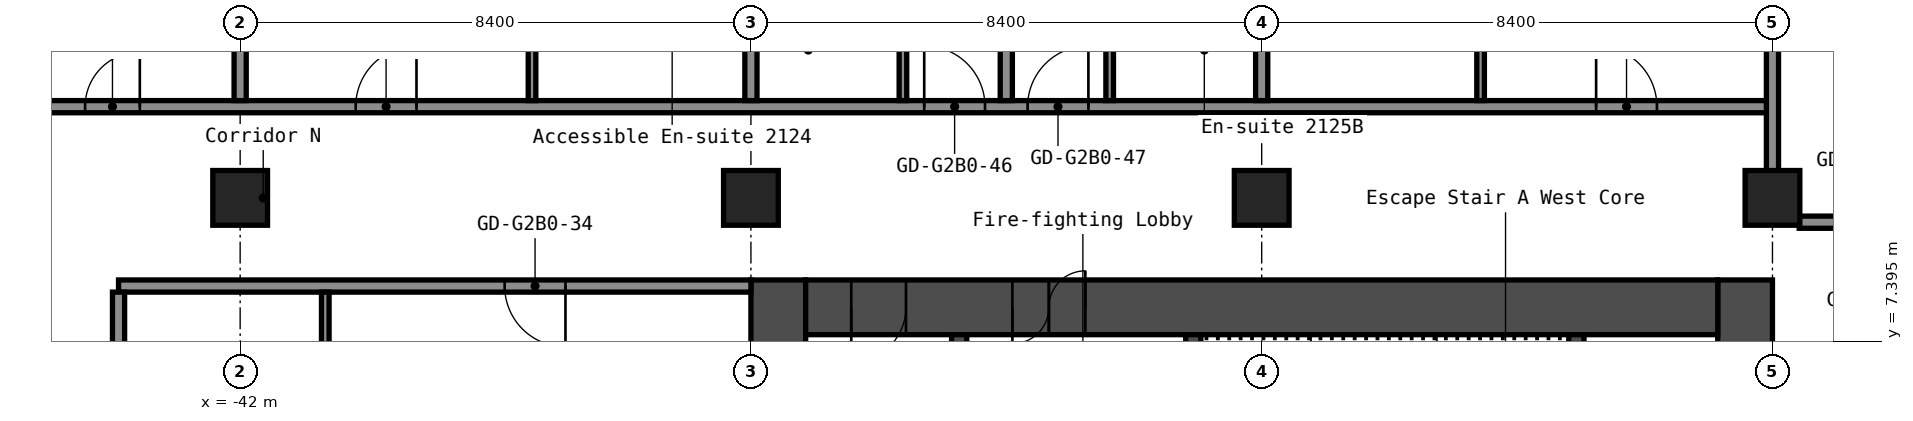
"""IFC4 building model, lengths in metres.
Left out: names, types, materials, properties, quantities, classifications, styles, units other than length and angle.
Written with IfcOpenShell. Run it as: python <this file> out.ifc"""

import sys

from ifc_helpers import new_model, si_unit, direction, frame, frame_2d, origin, origin_2d, place, context, subcontext, project, spatial, rectangle, hollow_rectangle, extrude, element, fill, save


model = new_model("IFC4")
c1 = context("Model", 3, precision=1e-05, world=origin(), true_north=direction((0.0, 1.0)))
c2 = subcontext(c1, "Body", "Model", "MODEL_VIEW")
j1 = project(units=[si_unit("LENGTHUNIT", "METRE"), si_unit("PLANEANGLEUNIT", "RADIAN")], contexts=[c1])
p1 = place(None, origin())
s1 = spatial("IfcSite", under=j1, at=p1, CompositionType="ELEMENT")
p2 = place(p1, origin())
s2 = spatial("IfcBuilding", under=s1, at=p2, CompositionType="ELEMENT")
p3 = place(p2, frame((0.0, 0.0, 78.6)))
s3 = spatial("IfcBuildingStorey", under=s2, at=p3, CompositionType="ELEMENT", Elevation=78.6)
for number, where, z_axis, x_axis in (
    (1, (-42.0, 9.75, 0.0), (0.0, 0.0, 1.0), (1.0, 0.0, 0.0)),
    (2, (-33.6, 9.75, 0.0), (0.0, 0.0, 1.0), (1.0, 0.0, 0.0)),
    (3, (-25.2, 9.75, 0.0), (0.0, 0.0, 1.0), (1.0, 0.0, 0.0)),
    (4, (-16.8, 9.75, 0.0), (0.0, 0.0, 1.0), (1.0, 0.0, 0.0)),
):
    element("IfcColumn", number, at=place(p3, frame(where, z_axis=z_axis, x_axis=x_axis)), inside=s3, PredefinedType="COLUMN", context=c2, shape_type="SweptSolid", body=[
        extrude(hollow_rectangle(XDim=0.9, YDim=0.9, WallThickness=0.036, at=origin_2d()), origin(), (0.0, 0.0, 1.0), 2.8),
    ])
p4 = place(p3, frame((-17.25, -8.4, 0.0), z_axis=(0.0, 0.0, 1.0), x_axis=(0.0, 1.0, 0.0)))
e5 = element("IfcWall", 5, at=p4, inside=s3, PredefinedType="SHEAR", context=c2, shape_type="SweptSolid", body=[
    extrude(rectangle(XDim=16.8, YDim=0.9, at=frame_2d((8.4, 0.0))), origin(), (0.0, 0.0, 1.0), 2.8),
])
p5 = place(p4, frame((7.6, 0.0, 0.0)))
e6 = element("IfcOpeningElement", 6, at=p5, cuts=e5, PredefinedType="OPENING", context=c2, shape_type="SweptSolid", body=[
    extrude(rectangle(XDim=1.2, YDim=2.1, at=frame_2d((0.6, 1.05))), frame((0.0, 0.46, 0.0), z_axis=(0.0, -1.0, 0.0), x_axis=(1.0, 0.0, 0.0)), (0.0, 0.0, 1.0), 0.92),
])
p6 = place(p3, frame((-33.15, -8.4, 0.0), z_axis=(0.0, 0.0, 1.0), x_axis=(0.0, 1.0, 0.0)))
e7 = element("IfcWall", 7, at=p6, inside=s3, PredefinedType="SHEAR", context=c2, shape_type="SweptSolid", body=[
    extrude(rectangle(XDim=16.8, YDim=0.9, at=frame_2d((8.4, 0.0))), origin(), (0.0, 0.0, 1.0), 2.8),
])
p7 = place(p3, frame((-32.7, 7.95, 0.0), z_axis=(0.0, 0.0, 1.0), x_axis=(1.0, 0.0, 0.0)))
e8 = element("IfcWall", 8, at=p7, inside=s3, PredefinedType="SHEAR", context=c2, shape_type="SweptSolid", body=[
    extrude(rectangle(XDim=15.0, YDim=0.9, at=frame_2d((7.5, 0.0))), origin(), (0.0, 0.0, 1.0), 2.8),
])
p8 = place(p7, frame((3.4, 0.0, 0.0)))
e9 = element("IfcOpeningElement", 9, at=p8, cuts=e8, PredefinedType="OPENING", context=c2, shape_type="SweptSolid", body=[
    extrude(rectangle(XDim=1.2, YDim=2.1, at=frame_2d((0.6, 1.05))), frame((0.0, 0.46, 0.0), z_axis=(0.0, -1.0, 0.0), x_axis=(1.0, 0.0, 0.0)), (0.0, 0.0, 1.0), 0.92),
])
p9 = place(p7, frame((0.75, 0.0, 0.0)))
e10 = element("IfcOpeningElement", 10, at=p9, cuts=e8, PredefinedType="OPENING", context=c2, shape_type="SweptSolid", body=[
    extrude(rectangle(XDim=0.9, YDim=2.1, at=frame_2d((0.45, 1.05))), frame((0.0, 0.46, 0.0), z_axis=(0.0, -1.0, 0.0), x_axis=(1.0, 0.0, 0.0)), (0.0, 0.0, 1.0), 0.92),
])
p10 = place(p3, frame((-20.025, 1.2, 0.0), z_axis=(0.0, 0.0, 1.0), x_axis=(0.0, 1.0, 0.0)))
e11 = element("IfcWall", 11, at=p10, inside=s3, PredefinedType="SHEAR", context=c2, shape_type="SweptSolid", body=[
    extrude(rectangle(XDim=6.3, YDim=0.25, at=frame_2d((3.15, 0.0))), origin(), (0.0, 0.0, 1.0), 2.8),
])
p11 = place(p3, frame((-26.325, 3.75, 0.0), z_axis=(0.0, 0.0, 1.0), x_axis=(0.0, 1.0, 0.0)))
e12 = element("IfcWall", 12, at=p11, inside=s3, PredefinedType="SHEAR", context=c2, shape_type="SweptSolid", body=[
    extrude(rectangle(XDim=3.75, YDim=0.25, at=frame_2d((1.875, 0.0))), origin(), (0.0, 0.0, 1.0), 2.8),
])
p12 = place(p11, frame((1.25, 0.0, 0.0)))
e13 = element("IfcOpeningElement", 13, at=p12, cuts=e12, PredefinedType="OPENING", context=c2, shape_type="SweptSolid", body=[
    extrude(rectangle(XDim=1.2, YDim=2.1, at=frame_2d((0.6, 1.05))), frame((0.0, 0.135, 0.0), z_axis=(0.0, -1.0, 0.0), x_axis=(1.0, 0.0, 0.0)), (0.0, 0.0, 1.0), 0.27),
])
p13 = place(p3, frame((-30.175, 1.45, 0.0), z_axis=(0.0, 0.0, 1.0), x_axis=(0.0, 1.0, 0.0)))
e14 = element("IfcWall", 14, at=p13, inside=s3, PredefinedType="SHEAR", context=c2, shape_type="SweptSolid", body=[
    extrude(rectangle(XDim=6.05, YDim=0.25, at=frame_2d((3.025, 0.0))), origin(), (0.0, 0.0, 1.0), 2.8),
])
p14 = place(p13, frame((2.625, 0.0, 0.0)))
e15 = element("IfcOpeningElement", 15, at=p14, cuts=e14, PredefinedType="OPENING", context=c2, shape_type="SweptSolid", body=[
    extrude(rectangle(XDim=1.1, YDim=2.1, at=frame_2d((0.55, 1.05))), frame((0.0, 0.135, 0.0), z_axis=(0.0, -1.0, 0.0), x_axis=(1.0, 0.0, 0.0)), (0.0, 0.0, 1.0), 0.27),
])
p15 = place(p3, frame((-44.0, 8.3, 0.0), z_axis=(0.0, 0.0, 1.0), x_axis=(1.0, 0.0, 0.0)))
e16 = element("IfcWall", 16, at=p15, inside=s3, PredefinedType="PARTITIONING", context=c2, shape_type="SweptSolid", body=[
    extrude(rectangle(XDim=10.4, YDim=0.2, at=frame_2d((5.2, 0.0))), origin(), (0.0, 0.0, 1.0), 2.8),
])
p16 = place(p15, frame((6.35, 0.0, 0.0)))
e17 = element("IfcOpeningElement", 17, at=p16, cuts=e16, PredefinedType="OPENING", context=c2, shape_type="SweptSolid", body=[
    extrude(rectangle(XDim=1.0, YDim=2.1, at=frame_2d((0.5, 1.05))), frame((0.0, 0.11, 0.0), z_axis=(0.0, -1.0, 0.0), x_axis=(1.0, 0.0, 0.0)), (0.0, 0.0, 1.0), 0.22),
])
p17 = place(p3, frame((-16.36, 9.35, 0.0), z_axis=(0.0, 0.0, 1.0), x_axis=(1.0, 0.0, 0.0)))
e18 = element("IfcWall", 18, at=p17, inside=s3, PredefinedType="PARTITIONING", context=c2, shape_type="SweptSolid", body=[
    extrude(rectangle(XDim=32.72, YDim=0.2, at=frame_2d((16.36, 0.0))), origin(), (0.0, 0.0, 1.0), 2.8),
])
p18 = place(p17, frame((0.79, 0.0, 0.0)))
e19 = element("IfcOpeningElement", 19, at=p18, cuts=e18, PredefinedType="OPENING", context=c2, shape_type="SweptSolid", body=[
    extrude(rectangle(XDim=0.9, YDim=2.1, at=frame_2d((0.45, 1.05))), frame((0.0, 0.11, 0.0), z_axis=(0.0, -1.0, 0.0), x_axis=(1.0, 0.0, 0.0)), (0.0, 0.0, 1.0), 0.22),
])
p19 = place(p17, frame((4.99, 0.0, 0.0)))
e20 = element("IfcOpeningElement", 20, at=p19, cuts=e18, PredefinedType="OPENING", context=c2, shape_type="SweptSolid", body=[
    extrude(rectangle(XDim=0.9, YDim=2.1, at=frame_2d((0.45, 1.05))), frame((0.0, 0.11, 0.0), z_axis=(0.0, -1.0, 0.0), x_axis=(1.0, 0.0, 0.0)), (0.0, 0.0, 1.0), 0.22),
])
p20 = place(p17, frame((9.275, 0.0, 0.0)))
e21 = element("IfcOpeningElement", 21, at=p20, cuts=e18, PredefinedType="OPENING", context=c2, shape_type="SweptSolid", body=[
    extrude(rectangle(XDim=0.9, YDim=2.1, at=frame_2d((0.45, 1.05))), frame((0.0, 0.11, 0.0), z_axis=(0.0, -1.0, 0.0), x_axis=(1.0, 0.0, 0.0)), (0.0, 0.0, 1.0), 0.22),
])
p21 = place(p17, frame((13.475, 0.0, 0.0)))
e22 = element("IfcOpeningElement", 22, at=p21, cuts=e18, PredefinedType="OPENING", context=c2, shape_type="SweptSolid", body=[
    extrude(rectangle(XDim=0.9, YDim=2.1, at=frame_2d((0.45, 1.05))), frame((0.0, 0.11, 0.0), z_axis=(0.0, -1.0, 0.0), x_axis=(1.0, 0.0, 0.0)), (0.0, 0.0, 1.0), 0.22),
])
p22 = place(p17, frame((19.21, 0.0, 0.0)))
e23 = element("IfcOpeningElement", 23, at=p22, cuts=e18, PredefinedType="OPENING", context=c2, shape_type="SweptSolid", body=[
    extrude(rectangle(XDim=1.0, YDim=2.1, at=frame_2d((0.5, 1.05))), frame((0.0, 0.11, 0.0), z_axis=(0.0, -1.0, 0.0), x_axis=(1.0, 0.0, 0.0)), (0.0, 0.0, 1.0), 0.22),
])
p23 = place(p17, frame((20.91, 0.0, 0.0)))
e24 = element("IfcOpeningElement", 24, at=p23, cuts=e18, PredefinedType="OPENING", context=c2, shape_type="SweptSolid", body=[
    extrude(rectangle(XDim=1.0, YDim=2.1, at=frame_2d((0.5, 1.05))), frame((0.0, 0.11, 0.0), z_axis=(0.0, -1.0, 0.0), x_axis=(1.0, 0.0, 0.0)), (0.0, 0.0, 1.0), 0.22),
])
p24 = place(p17, frame((27.61, 0.0, 0.0)))
e25 = element("IfcOpeningElement", 25, at=p24, cuts=e18, PredefinedType="OPENING", context=c2, shape_type="SweptSolid", body=[
    extrude(rectangle(XDim=1.0, YDim=2.1, at=frame_2d((0.5, 1.05))), frame((0.0, 0.11, 0.0), z_axis=(0.0, -1.0, 0.0), x_axis=(1.0, 0.0, 0.0)), (0.0, 0.0, 1.0), 0.22),
])
p25 = place(p17, frame((29.31, 0.0, 0.0)))
e26 = element("IfcOpeningElement", 26, at=p25, cuts=e18, PredefinedType="OPENING", context=c2, shape_type="SweptSolid", body=[
    extrude(rectangle(XDim=1.0, YDim=2.1, at=frame_2d((0.5, 1.05))), frame((0.0, 0.11, 0.0), z_axis=(0.0, -1.0, 0.0), x_axis=(1.0, 0.0, 0.0)), (0.0, 0.0, 1.0), 0.22),
])
p26 = place(p3, frame((-46.5, 11.25, 0.0), z_axis=(0.0, 0.0, 1.0), x_axis=(1.0, 0.0, 0.0)))
e27 = element("IfcWall", 27, at=p26, inside=s3, PredefinedType="PARTITIONING", context=c2, shape_type="SweptSolid", body=[
    extrude(rectangle(XDim=29.7, YDim=0.2, at=frame_2d((14.85, 0.0))), origin(), (0.0, 0.0, 1.0), 2.8),
])
p27 = place(p26, frame((1.95, 0.0, 0.0)))
e28 = element("IfcOpeningElement", 28, at=p27, cuts=e27, PredefinedType="OPENING", context=c2, shape_type="SweptSolid", body=[
    extrude(rectangle(XDim=0.9, YDim=2.1, at=frame_2d((0.45, 1.05))), frame((0.0, 0.11, 0.0), z_axis=(0.0, -1.0, 0.0), x_axis=(1.0, 0.0, 0.0)), (0.0, 0.0, 1.0), 0.22),
])
p28 = place(p26, frame((6.4, 0.0, 0.0)))
e29 = element("IfcOpeningElement", 29, at=p28, cuts=e27, PredefinedType="OPENING", context=c2, shape_type="SweptSolid", body=[
    extrude(rectangle(XDim=1.0, YDim=2.1, at=frame_2d((0.5, 1.05))), frame((0.0, 0.11, 0.0), z_axis=(0.0, -1.0, 0.0), x_axis=(1.0, 0.0, 0.0)), (0.0, 0.0, 1.0), 0.22),
])
p29 = place(p26, frame((15.75, 0.0, 0.0)))
e30 = element("IfcOpeningElement", 30, at=p29, cuts=e27, PredefinedType="OPENING", context=c2, shape_type="SweptSolid", body=[
    extrude(rectangle(XDim=1.0, YDim=2.1, at=frame_2d((0.5, 1.05))), frame((0.0, 0.11, 0.0), z_axis=(0.0, -1.0, 0.0), x_axis=(1.0, 0.0, 0.0)), (0.0, 0.0, 1.0), 0.22),
])
p30 = place(p26, frame((17.45, 0.0, 0.0)))
e31 = element("IfcOpeningElement", 31, at=p30, cuts=e27, PredefinedType="OPENING", context=c2, shape_type="SweptSolid", body=[
    extrude(rectangle(XDim=1.0, YDim=2.1, at=frame_2d((0.5, 1.05))), frame((0.0, 0.11, 0.0), z_axis=(0.0, -1.0, 0.0), x_axis=(1.0, 0.0, 0.0)), (0.0, 0.0, 1.0), 0.22),
])
p31 = place(p26, frame((26.8, 0.0, 0.0)))
e32 = element("IfcOpeningElement", 32, at=p31, cuts=e27, PredefinedType="OPENING", context=c2, shape_type="SweptSolid", body=[
    extrude(rectangle(XDim=1.0, YDim=2.1, at=frame_2d((0.5, 1.05))), frame((0.0, 0.11, 0.0), z_axis=(0.0, -1.0, 0.0), x_axis=(1.0, 0.0, 0.0)), (0.0, 0.0, 1.0), 0.22),
])
p32 = place(p3, frame((-44.0, -8.2, 0.0), z_axis=(0.0, 0.0, 1.0), x_axis=(0.0, 1.0, 0.0)))
e33 = element("IfcWall", 33, at=p32, inside=s3, PredefinedType="PARTITIONING", context=c2, shape_type="SweptSolid", body=[
    extrude(rectangle(XDim=16.4, YDim=0.2, at=frame_2d((8.2, 0.0))), origin(), (0.0, 0.0, 1.0), 2.8),
])
p33 = place(p3, frame((-42.0, 11.35, 0.0), z_axis=(0.0, 0.0, 1.0), x_axis=(0.0, 1.0, 0.0)))
e34 = element("IfcWall", 34, at=p33, inside=s3, PredefinedType="PARTITIONING", context=c2, shape_type="SweptSolid", body=[
    extrude(rectangle(XDim=12.2, YDim=0.2, at=frame_2d((6.1, 0.0))), origin(), (0.0, 0.0, 1.0), 2.8),
])
p34 = place(p3, frame((-40.6, 4.9, 0.0), z_axis=(0.0, 0.0, 1.0), x_axis=(0.0, 1.0, 0.0)))
e35 = element("IfcWall", 35, at=p34, inside=s3, PredefinedType="PARTITIONING", context=c2, shape_type="SweptSolid", body=[
    extrude(rectangle(XDim=3.3, YDim=0.125, at=frame_2d((1.65, 0.0))), origin(), (0.0, 0.0, 1.0), 2.8),
])
p35 = place(p3, frame((-37.2, 11.35, 0.0), z_axis=(0.0, 0.0, 1.0), x_axis=(0.0, 1.0, 0.0)))
e36 = element("IfcWall", 36, at=p35, inside=s3, PredefinedType="PARTITIONING", context=c2, shape_type="SweptSolid", body=[
    extrude(rectangle(XDim=3.3, YDim=0.125, at=frame_2d((1.65, 0.0))), origin(), (0.0, 0.0, 1.0), 2.8),
])
p36 = place(p35, frame((1.1, 0.0, 0.0)))
e37 = element("IfcOpeningElement", 37, at=p36, cuts=e36, PredefinedType="OPENING", context=c2, shape_type="SweptSolid", body=[
    extrude(rectangle(XDim=1.0, YDim=2.1, at=frame_2d((0.5, 1.05))), frame((0.0, 0.073, 0.0), z_axis=(0.0, -1.0, 0.0), x_axis=(1.0, 0.0, 0.0)), (0.0, 0.0, 1.0), 0.145),
])
p37 = place(p3, frame((-33.6, 11.35, 0.0), z_axis=(0.0, 0.0, 1.0), x_axis=(0.0, 1.0, 0.0)))
e38 = element("IfcWall", 38, at=p37, inside=s3, PredefinedType="PARTITIONING", context=c2, shape_type="SweptSolid", body=[
    extrude(rectangle(XDim=12.2, YDim=0.2, at=frame_2d((6.1, 0.0))), origin(), (0.0, 0.0, 1.0), 2.8),
])
p38 = place(p3, frame((-31.1, 11.35, 0.0), z_axis=(0.0, 0.0, 1.0), x_axis=(0.0, 1.0, 0.0)))
e39 = element("IfcWall", 39, at=p38, inside=s3, PredefinedType="PARTITIONING", context=c2, shape_type="SweptSolid", body=[
    extrude(rectangle(XDim=2.9, YDim=0.125, at=frame_2d((1.45, 0.0))), origin(), (0.0, 0.0, 1.0), 2.8),
])
p39 = place(p38, frame((1.5, 0.0, 0.0)))
e40 = element("IfcOpeningElement", 40, at=p39, cuts=e39, PredefinedType="OPENING", context=c2, shape_type="SweptSolid", body=[
    extrude(rectangle(XDim=0.8, YDim=2.1, at=frame_2d((0.4, 1.05))), frame((0.0, 0.073, 0.0), z_axis=(0.0, -1.0, 0.0), x_axis=(1.0, 0.0, 0.0)), (0.0, 0.0, 1.0), 0.145),
])
p40 = place(p3, frame((-29.4, 11.35, 0.0), z_axis=(0.0, 0.0, 1.0), x_axis=(0.0, 1.0, 0.0)))
e41 = element("IfcWall", 41, at=p40, inside=s3, PredefinedType="PARTITIONING", context=c2, shape_type="SweptSolid", body=[
    extrude(rectangle(XDim=12.2, YDim=0.2, at=frame_2d((6.1, 0.0))), origin(), (0.0, 0.0, 1.0), 2.8),
])
p41 = place(p3, frame((-27.7, 11.35, 0.0), z_axis=(0.0, 0.0, 1.0), x_axis=(0.0, 1.0, 0.0)))
e42 = element("IfcWall", 42, at=p41, inside=s3, PredefinedType="PARTITIONING", context=c2, shape_type="SweptSolid", body=[
    extrude(rectangle(XDim=2.9, YDim=0.125, at=frame_2d((1.45, 0.0))), origin(), (0.0, 0.0, 1.0), 2.8),
])
p42 = place(p41, frame((1.5, 0.0, 0.0)))
e43 = element("IfcOpeningElement", 43, at=p42, cuts=e42, PredefinedType="OPENING", context=c2, shape_type="SweptSolid", body=[
    extrude(rectangle(XDim=0.8, YDim=2.1, at=frame_2d((0.4, 1.05))), frame((0.0, 0.073, 0.0), z_axis=(0.0, -1.0, 0.0), x_axis=(1.0, 0.0, 0.0)), (0.0, 0.0, 1.0), 0.145),
])
p43 = place(p3, frame((-25.2, 11.35, 0.0), z_axis=(0.0, 0.0, 1.0), x_axis=(0.0, 1.0, 0.0)))
e44 = element("IfcWall", 44, at=p43, inside=s3, PredefinedType="PARTITIONING", context=c2, shape_type="SweptSolid", body=[
    extrude(rectangle(XDim=12.2, YDim=0.2, at=frame_2d((6.1, 0.0))), origin(), (0.0, 0.0, 1.0), 2.8),
])
p44 = place(p3, frame((-21.6, 11.35, 0.0), z_axis=(0.0, 0.0, 1.0), x_axis=(0.0, 1.0, 0.0)))
e45 = element("IfcWall", 45, at=p44, inside=s3, PredefinedType="PARTITIONING", context=c2, shape_type="SweptSolid", body=[
    extrude(rectangle(XDim=3.3, YDim=0.125, at=frame_2d((1.65, 0.0))), origin(), (0.0, 0.0, 1.0), 2.8),
])
p45 = place(p44, frame((1.1, 0.0, 0.0)))
e46 = element("IfcOpeningElement", 46, at=p45, cuts=e45, PredefinedType="OPENING", context=c2, shape_type="SweptSolid", body=[
    extrude(rectangle(XDim=1.0, YDim=2.1, at=frame_2d((0.5, 1.05))), frame((0.0, 0.073, 0.0), z_axis=(0.0, -1.0, 0.0), x_axis=(1.0, 0.0, 0.0)), (0.0, 0.0, 1.0), 0.145),
])
p46 = place(p3, frame((-16.8, 10.19, 0.0), z_axis=(0.0, 0.0, 1.0), x_axis=(0.0, 1.0, 0.0)))
e47 = element("IfcWall", 47, at=p46, inside=s3, PredefinedType="PARTITIONING", context=c2, shape_type="SweptSolid", body=[
    extrude(rectangle(XDim=13.36, YDim=0.2, at=frame_2d((6.68, 0.0))), origin(), (0.0, 0.0, 1.0), 2.8),
])
p47 = place(p8, origin())
e48 = element("IfcDoor", 48, at=p47, inside=s3, OperationType="DOUBLE_DOOR_SINGLE_SWING", PredefinedType="DOOR", context=c2, shape_type="SweptSolid", body=[
    extrude(rectangle(XDim=1.2, YDim=2.1, at=frame_2d((0.6, 1.05))), frame((0.0, 0.025, 0.0), z_axis=(0.0, -1.0, 0.0), x_axis=(1.0, 0.0, 0.0)), (0.0, 0.0, 1.0), 0.05),
])
fill(e9, e48)
p48 = place(p9, origin())
e49 = element("IfcDoor", 49, at=p48, inside=s3, OperationType="SINGLE_SWING_LEFT", PredefinedType="DOOR", context=c2, shape_type="SweptSolid", body=[
    extrude(rectangle(XDim=0.9, YDim=2.1, at=frame_2d((0.45, 1.05))), frame((0.0, 0.025, 0.0), z_axis=(0.0, -1.0, 0.0), x_axis=(1.0, 0.0, 0.0)), (0.0, 0.0, 1.0), 0.05),
])
fill(e10, e49)
p49 = place(p16, origin())
e50 = element("IfcDoor", 50, at=p49, inside=s3, OperationType="SINGLE_SWING_RIGHT", PredefinedType="DOOR", context=c2, shape_type="SweptSolid", body=[
    extrude(rectangle(XDim=1.0, YDim=2.1, at=frame_2d((0.5, 1.05))), frame((0.0, 0.025, 0.0), z_axis=(0.0, -1.0, 0.0), x_axis=(1.0, 0.0, 0.0)), (0.0, 0.0, 1.0), 0.05),
])
fill(e17, e50)
p50 = place(p27, origin())
e51 = element("IfcDoor", 51, at=p50, inside=s3, OperationType="SINGLE_SWING_LEFT", PredefinedType="DOOR", context=c2, shape_type="SweptSolid", body=[
    extrude(rectangle(XDim=0.9, YDim=2.1, at=frame_2d((0.45, 1.05))), frame((0.0, 0.025, 0.0), z_axis=(0.0, -1.0, 0.0), x_axis=(1.0, 0.0, 0.0)), (0.0, 0.0, 1.0), 0.05),
])
fill(e28, e51)
p51 = place(p28, origin())
e52 = element("IfcDoor", 52, at=p51, inside=s3, OperationType="SINGLE_SWING_LEFT", PredefinedType="DOOR", context=c2, shape_type="SweptSolid", body=[
    extrude(rectangle(XDim=1.0, YDim=2.1, at=frame_2d((0.5, 1.05))), frame((0.0, 0.025, 0.0), z_axis=(0.0, -1.0, 0.0), x_axis=(1.0, 0.0, 0.0)), (0.0, 0.0, 1.0), 0.05),
])
fill(e29, e52)
p52 = place(p29, origin())
e53 = element("IfcDoor", 53, at=p52, inside=s3, OperationType="SINGLE_SWING_RIGHT", PredefinedType="DOOR", context=c2, shape_type="SweptSolid", body=[
    extrude(rectangle(XDim=1.0, YDim=2.1, at=frame_2d((0.5, 1.05))), frame((0.0, 0.025, 0.0), z_axis=(0.0, -1.0, 0.0), x_axis=(1.0, 0.0, 0.0)), (0.0, 0.0, 1.0), 0.05),
])
fill(e30, e53)
p53 = place(p30, origin())
e54 = element("IfcDoor", 54, at=p53, inside=s3, OperationType="SINGLE_SWING_LEFT", PredefinedType="DOOR", context=c2, shape_type="SweptSolid", body=[
    extrude(rectangle(XDim=1.0, YDim=2.1, at=frame_2d((0.5, 1.05))), frame((0.0, 0.025, 0.0), z_axis=(0.0, -1.0, 0.0), x_axis=(1.0, 0.0, 0.0)), (0.0, 0.0, 1.0), 0.05),
])
fill(e31, e54)
p54 = place(p31, origin())
e55 = element("IfcDoor", 55, at=p54, inside=s3, OperationType="SINGLE_SWING_RIGHT", PredefinedType="DOOR", context=c2, shape_type="SweptSolid", body=[
    extrude(rectangle(XDim=1.0, YDim=2.1, at=frame_2d((0.5, 1.05))), frame((0.0, 0.025, 0.0), z_axis=(0.0, -1.0, 0.0), x_axis=(1.0, 0.0, 0.0)), (0.0, 0.0, 1.0), 0.05),
])
fill(e32, e55)
save(model, sys.argv[1])
